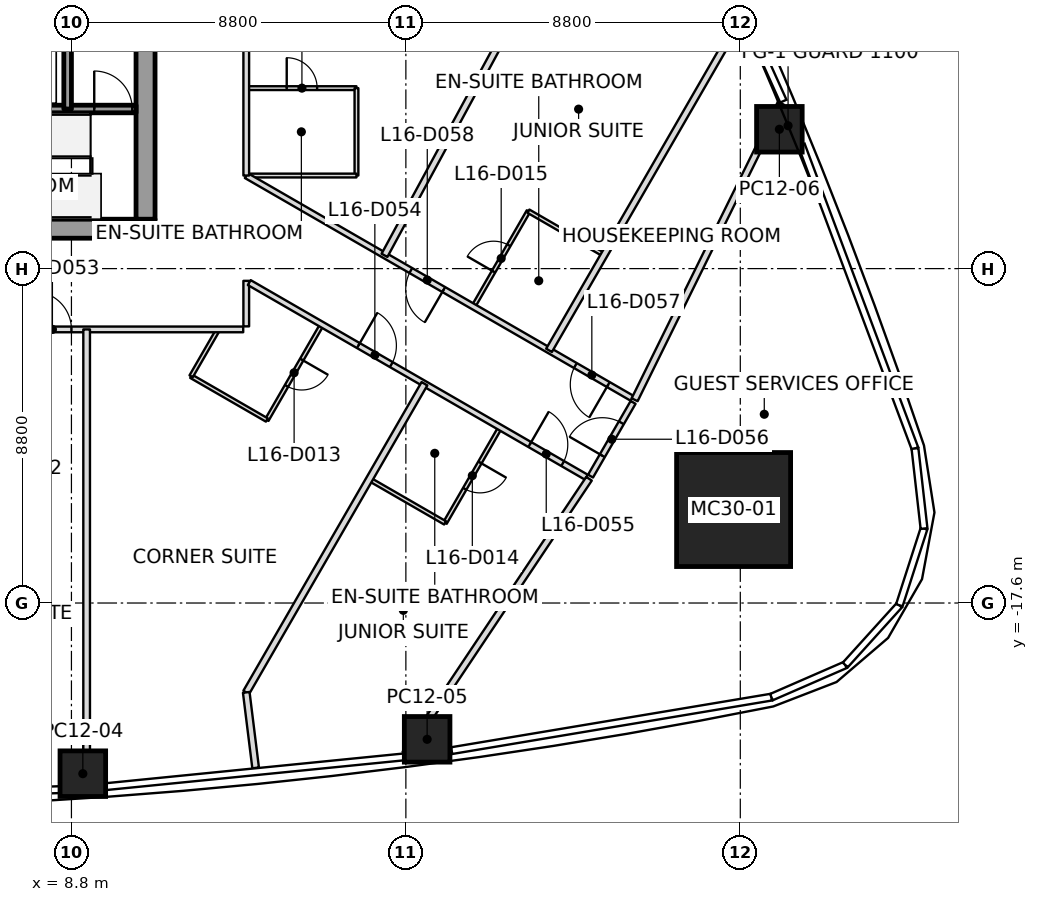
"""IFC4 building model, lengths in metres.
Left out: names, types, materials, properties, quantities, classifications, styles, units other than length and angle.
Written with IfcOpenShell. Run it as: python <this file> out.ifc"""

import sys

from ifc_helpers import new_model, si_unit, direction, frame, frame_2d, origin, origin_2d, place, context, subcontext, project, spatial, rectangle, extrude, clip, halfspace, element, fill, save


model = new_model("IFC4")
c1 = context("Model", 3, precision=1e-05, world=origin(), true_north=direction((0.0, 1.0)))
c2 = subcontext(c1, "Body", "Model", "MODEL_VIEW")
j1 = project(units=[si_unit("LENGTHUNIT", "METRE"), si_unit("PLANEANGLEUNIT", "RADIAN")], contexts=[c1])
p1 = place(None, origin())
s1 = spatial("IfcSite", under=j1, at=p1, CompositionType="ELEMENT")
p2 = place(p1, origin())
s2 = spatial("IfcBuilding", under=s1, at=p2, CompositionType="ELEMENT")
p3 = place(p2, frame((0.0, 0.0, 81.3)))
s3 = spatial("IfcBuildingStorey", under=s2, at=p3, CompositionType="ELEMENT", Elevation=81.3)
p4 = place(p3, frame((26.224, -15.14, 0.0), z_axis=(-0.030531992032, 0.017607001884, 0.999378702468), x_axis=(0.999533790055, 0.000537827582, 0.03052725469)))
e1 = element("IfcColumn", 1, at=p4, inside=s3, PredefinedType="COLUMN", context=c2, shape_type="SweptSolid", body=[
    extrude(rectangle(XDim=3.0, YDim=3.0, at=origin_2d()), origin(), (0.0, 0.0, 1.0), 3.702),
])
p5 = place(p3, frame((9.1, -22.091, 0.0), z_axis=(-0.009632635025, 0.012073782257, 0.999880710947), x_axis=(0.997756100606, 0.066371190404, 0.008810720082)))
e2 = element("IfcColumn", 2, at=p5, inside=s3, PredefinedType="COLUMN", context=c2, shape_type="SweptSolid", body=[
    clip(extrude(rectangle(XDim=1.2, YDim=1.2, at=origin_2d()), origin(), (0.0, 0.0, 1.0), 3.7), halfspace(frame((0.0, 0.0, 0.009)), True)),
])
p6 = place(p3, frame((18.16, -21.187, 0.0), z_axis=(-0.019262752912, 0.011346553085, 0.999750069809), x_axis=(0.991035318341, 0.132436881846, 0.017591763067)))
e3 = element("IfcColumn", 3, at=p6, inside=s3, PredefinedType="COLUMN", context=c2, shape_type="SweptSolid", body=[
    clip(extrude(rectangle(XDim=1.2, YDim=1.2, at=origin_2d()), origin(), (0.0, 0.0, 1.0), 3.701), halfspace(frame((0.0, 0.0, 0.008)), True)),
])
p7 = place(p3, frame((27.428, -5.133, 0.0), z_axis=(-0.019460669214, 0.010950749456, 0.999750650632), x_axis=(-0.381024023637, 0.924398704075, -0.017542215233)))
e4 = element("IfcColumn", 4, at=p7, inside=s3, PredefinedType="COLUMN", context=c2, shape_type="SweptSolid", body=[
    extrude(rectangle(XDim=1.2, YDim=1.2, at=origin_2d()), origin(), (0.0, 0.0, 1.0), 3.701),
])
p8 = place(p3, frame((-11.0, -7.75, 0.0), z_axis=(0.0, 0.0, 1.0), x_axis=(1.0, 0.0, 0.0)))
e5 = element("IfcWall", 5, at=p8, inside=s3, PredefinedType="SHEAR", context=c2, shape_type="SweptSolid", body=[
    extrude(rectangle(XDim=22.0, YDim=0.5, at=frame_2d((11.0, 0.0))), origin(), (0.0, 0.0, 1.0), 3.7),
])
p9 = place(p8, frame((10.45, 0.0, 0.0)))
e6 = element("IfcOpeningElement", 6, at=p9, cuts=e5, PredefinedType="OPENING", context=c2, shape_type="SweptSolid", body=[
    extrude(rectangle(XDim=1.1, YDim=2.1, at=frame_2d((0.55, 1.05))), frame((0.0, 0.25, 0.0), z_axis=(0.0, -1.0, 0.0), x_axis=(1.0, 0.0, 0.0)), (0.0, 0.0, 1.0), 0.5),
])
p10 = place(p3, frame((10.75, -7.5, 0.0), z_axis=(0.0, 0.0, 1.0), x_axis=(0.0, 1.0, 0.0)))
e7 = element("IfcWall", 7, at=p10, inside=s3, PredefinedType="SHEAR", context=c2, shape_type="SweptSolid", body=[
    extrude(rectangle(XDim=15.0, YDim=0.5, at=frame_2d((7.5, 0.0))), origin(), (0.0, 0.0, 1.0), 3.7),
])
p11 = place(p10, frame((6.6, 0.0, 0.0)))
e8 = element("IfcOpeningElement", 8, at=p11, cuts=e7, PredefinedType="OPENING", context=c2, shape_type="SweptSolid", body=[
    extrude(rectangle(XDim=1.8, YDim=2.1, at=frame_2d((0.9, 1.05))), frame((0.0, 0.25, 0.0), z_axis=(0.0, -1.0, 0.0), x_axis=(1.0, 0.0, 0.0)), (0.0, 0.0, 1.0), 0.5),
])
p12 = place(p3, frame((6.1, -4.6, 0.0), z_axis=(0.0, 0.0, 1.0), x_axis=(1.0, 0.0, 0.0)))
e9 = element("IfcWall", 9, at=p12, inside=s3, PredefinedType="SOLIDWALL", context=c2, shape_type="SweptSolid", body=[
    extrude(rectangle(XDim=2.6, YDim=0.2, at=frame_2d((1.3, 0.0))), origin(), (0.0, 0.0, 1.0), 3.55),
])
p13 = place(p3, frame((8.7, -4.6, 0.0), z_axis=(0.0, 0.0, 1.0), x_axis=(1.0, 0.0, 0.0)))
e10 = element("IfcWall", 10, at=p13, inside=s3, PredefinedType="SOLIDWALL", context=c2, shape_type="SweptSolid", body=[
    extrude(rectangle(XDim=1.8, YDim=0.2, at=frame_2d((0.9, 0.0))), origin(), (0.0, 0.0, 1.0), 3.55),
])
p14 = place(p13, frame((0.7, 0.0, 0.0)))
e11 = element("IfcOpeningElement", 11, at=p14, cuts=e10, PredefinedType="OPENING", context=c2, shape_type="SweptSolid", body=[
    extrude(rectangle(XDim=1.0, YDim=2.1, at=frame_2d((0.5, 1.05))), frame((0.0, 0.1, 0.0), z_axis=(0.0, -1.0, 0.0), x_axis=(1.0, 0.0, 0.0)), (0.0, 0.0, 1.0), 0.2),
])
p15 = place(p3, frame((8.7, -1.8, 0.0), z_axis=(0.0, 0.0, 1.0), x_axis=(0.0, -1.0, 0.0)))
e12 = element("IfcWall", 12, at=p15, inside=s3, PredefinedType="SOLIDWALL", context=c2, shape_type="SweptSolid", body=[
    extrude(rectangle(XDim=2.8, YDim=0.2, at=frame_2d((1.4, 0.0))), origin(), (0.0, 0.0, 1.0), 3.55),
])
p16 = place(p3, frame((9.2, -10.4, 0.0), z_axis=(0.0, 0.0, 1.0), x_axis=(0.0, -1.0, 0.0)))
e13 = element("IfcWall", 13, at=p16, inside=s3, PredefinedType="PARTITIONING", context=c2, shape_type="SweptSolid", body=[
    extrude(rectangle(XDim=12.213, YDim=0.175, at=frame_2d((6.106, 0.0))), origin(), (0.0, 0.0, 1.0), 3.15),
])
p17 = place(p3, frame((18.089, -11.83, 0.0), z_axis=(0.0, 0.0, 1.0), x_axis=(-0.500005634617, -0.866022150612, 0.0)))
e14 = element("IfcWall", 14, at=p17, inside=s3, PredefinedType="PARTITIONING", context=c2, shape_type="SweptSolid", body=[
    extrude(rectangle(XDim=9.378, YDim=0.175, at=frame_2d((4.689, 0.0))), origin(), (0.0, 0.0, 1.0), 3.093),
])
p18 = place(p3, frame((13.4, -19.951, 0.0), z_axis=(0.0, 0.0, 1.0), x_axis=(0.123344664517, -0.992363891793, 0.0)))
e15 = element("IfcWall", 15, at=p18, inside=s3, PredefinedType="PARTITIONING", context=c2, shape_type="SweptSolid", body=[
    extrude(rectangle(XDim=2.003, YDim=0.175, at=frame_2d((1.001, 0.0))), origin(), (0.0, 0.0, 1.0), 2.934),
])
p19 = place(p3, frame((23.685, 3.826, 0.0), z_axis=(0.0, 0.0, 1.0), x_axis=(-0.476143437268, -0.879367629121, 0.0)))
e16 = element("IfcWall", 16, at=p19, inside=s3, PredefinedType="PARTITIONING", context=c2, shape_type="SweptSolid", body=[
    extrude(rectangle(XDim=13.962, YDim=0.175, at=frame_2d((6.981, 0.0))), origin(), (0.0, 0.0, 1.0), 2.947),
])
p20 = place(p3, frame((22.419, -14.33, 0.0), z_axis=(0.0, 0.0, 1.0), x_axis=(-0.555535204136, -0.831493016787, 0.0)))
e17 = element("IfcWall", 17, at=p20, inside=s3, PredefinedType="PARTITIONING", context=c2, shape_type="SweptSolid", body=[
    extrude(rectangle(XDim=8.701, YDim=0.175, at=frame_2d((4.351, 0.0))), origin(), (0.0, 0.0, 1.0), 3.15),
])
p21 = place(p3, frame((26.61, -1.871, 0.0), z_axis=(0.0, 0.0, 1.0), x_axis=(-0.500003296978, -0.866023500265, 0.0)))
e18 = element("IfcWall", 18, at=p21, inside=s3, PredefinedType="PARTITIONING", context=c2, shape_type="SweptSolid", body=[
    extrude(rectangle(XDim=10.485, YDim=0.175, at=frame_2d((5.242, 0.0))), origin(), (0.0, 0.0, 1.0), 2.934),
])
p22 = place(p3, frame((23.619, -12.251, 0.0), z_axis=(0.0, 0.0, 1.0), x_axis=(0.442347207514, 0.896843881623, 0.0)))
e19 = element("IfcWall", 19, at=p22, inside=s3, PredefinedType="PARTITIONING", context=c2, shape_type="SweptSolid", body=[
    extrude(rectangle(XDim=8.701, YDim=0.175, at=frame_2d((4.351, 0.0))), origin(), (0.0, 0.0, 1.0), 3.15),
])
p23 = place(p3, frame((-13.32, -10.4, 0.0), z_axis=(0.0, 0.0, 1.0), x_axis=(1.0, 0.0, 0.0)))
e20 = element("IfcWall", 20, at=p23, inside=s3, PredefinedType="PARTITIONING", context=c2, shape_type="SweptSolid", body=[
    extrude(rectangle(XDim=26.64, YDim=0.15, at=frame_2d((13.32, 0.0))), origin(), (0.0, 0.0, 1.0), 2.947),
])
p24 = place(p23, frame((7.72, 0.0, 0.0)))
e21 = element("IfcOpeningElement", 21, at=p24, cuts=e20, PredefinedType="OPENING", context=c2, shape_type="SweptSolid", body=[
    extrude(rectangle(XDim=1.0, YDim=2.1, at=frame_2d((0.5, 1.05))), frame((0.0, 0.075, 0.0), z_axis=(0.0, -1.0, 0.0), x_axis=(1.0, 0.0, 0.0)), (0.0, 0.0, 1.0), 0.15),
])
p25 = place(p23, frame((11.92, 0.0, 0.0)))
e22 = element("IfcOpeningElement", 22, at=p25, cuts=e20, PredefinedType="OPENING", context=c2, shape_type="SweptSolid", body=[
    extrude(rectangle(XDim=1.0, YDim=2.1, at=frame_2d((0.5, 1.05))), frame((0.0, 0.075, 0.0), z_axis=(0.0, -1.0, 0.0), x_axis=(1.0, 0.0, 0.0)), (0.0, 0.0, 1.0), 0.15),
])
p26 = place(p23, frame((16.52, 0.0, 0.0)))
e23 = element("IfcOpeningElement", 23, at=p26, cuts=e20, PredefinedType="OPENING", context=c2, shape_type="SweptSolid", body=[
    extrude(rectangle(XDim=1.0, YDim=2.1, at=frame_2d((0.5, 1.05))), frame((0.0, 0.075, 0.0), z_axis=(0.0, -1.0, 0.0), x_axis=(1.0, 0.0, 0.0)), (0.0, 0.0, 1.0), 0.15),
])
p27 = place(p23, frame((21.12, 0.0, 0.0)))
e24 = element("IfcOpeningElement", 24, at=p27, cuts=e20, PredefinedType="OPENING", context=c2, shape_type="SweptSolid", body=[
    extrude(rectangle(XDim=1.0, YDim=2.1, at=frame_2d((0.5, 1.05))), frame((0.0, 0.075, 0.0), z_axis=(0.0, -1.0, 0.0), x_axis=(1.0, 0.0, 0.0)), (0.0, 0.0, 1.0), 0.15),
])
p28 = place(p3, frame((13.4, -10.32, 0.0), z_axis=(0.0, 0.0, 1.0), x_axis=(0.0, 1.0, 0.0)))
e25 = element("IfcWall", 25, at=p28, inside=s3, PredefinedType="PARTITIONING", context=c2, shape_type="SweptSolid", body=[
    extrude(rectangle(XDim=1.198, YDim=0.15, at=frame_2d((0.599, 0.0))), origin(), (0.0, 0.0, 1.0), 2.797),
])
p29 = place(p3, frame((13.479, -9.168, 0.0), z_axis=(0.0, 0.0, 1.0), x_axis=(0.866025631158, -0.499999606177, 0.0)))
e26 = element("IfcWall", 26, at=p29, inside=s3, PredefinedType="PARTITIONING", context=c2, shape_type="SweptSolid", body=[
    extrude(rectangle(XDim=10.243, YDim=0.15, at=frame_2d((5.122, 0.0))), origin(), (0.0, 0.0, 1.0), 2.797),
])
p30 = place(p29, frame((3.316, 0.0, 0.0)))
e27 = element("IfcOpeningElement", 27, at=p30, cuts=e26, PredefinedType="OPENING", context=c2, shape_type="SweptSolid", body=[
    extrude(rectangle(XDim=1.0, YDim=2.1, at=frame_2d((0.5, 1.05))), frame((0.0, 0.075, 0.0), z_axis=(0.0, -1.0, 0.0), x_axis=(1.0, 0.0, 0.0)), (0.0, 0.0, 1.0), 0.15),
])
p31 = place(p29, frame((8.523, 0.0, 0.0)))
e28 = element("IfcOpeningElement", 28, at=p31, cuts=e26, PredefinedType="OPENING", context=c2, shape_type="SweptSolid", body=[
    extrude(rectangle(XDim=1.0, YDim=2.1, at=frame_2d((0.5, 1.05))), frame((0.0, 0.075, 0.0), z_axis=(0.0, -1.0, 0.0), x_axis=(1.0, 0.0, 0.0)), (0.0, 0.0, 1.0), 0.15),
])
p32 = place(p3, frame((23.55, -12.211, 0.0), z_axis=(0.0, 0.0, 1.0), x_axis=(-0.866028447449, 0.499994728181, 0.0)))
e29 = element("IfcWall", 29, at=p32, inside=s3, PredefinedType="PARTITIONING", context=c2, shape_type="SweptSolid", body=[
    extrude(rectangle(XDim=11.72, YDim=0.15, at=frame_2d((5.86, 0.0))), origin(), (0.0, 0.0, 1.0), 2.947),
])
p33 = place(p32, frame((0.72, 0.0, 0.0)))
e30 = element("IfcOpeningElement", 30, at=p33, cuts=e29, PredefinedType="OPENING", context=c2, shape_type="SweptSolid", body=[
    extrude(rectangle(XDim=1.0, YDim=2.1, at=frame_2d((0.5, 1.05))), frame((0.0, 0.075, 0.0), z_axis=(0.0, -1.0, 0.0), x_axis=(1.0, 0.0, 0.0)), (0.0, 0.0, 1.0), 0.15),
])
p34 = place(p32, frame((5.72, 0.0, 0.0)))
e31 = element("IfcOpeningElement", 31, at=p34, cuts=e29, PredefinedType="OPENING", context=c2, shape_type="SweptSolid", body=[
    extrude(rectangle(XDim=1.0, YDim=2.1, at=frame_2d((0.5, 1.05))), frame((0.0, 0.075, 0.0), z_axis=(0.0, -1.0, 0.0), x_axis=(1.0, 0.0, 0.0)), (0.0, 0.0, 1.0), 0.15),
])
p35 = place(p3, frame((13.4, -6.351, 0.0), z_axis=(0.0, 0.0, 1.0), x_axis=(0.0, 1.0, 0.0)))
e32 = element("IfcWall", 32, at=p35, inside=s3, PredefinedType="PARTITIONING", context=c2, shape_type="SweptSolid", body=[
    extrude(rectangle(XDim=16.671, YDim=0.15, at=frame_2d((8.335, 0.0))), origin(), (0.0, 0.0, 1.0), 2.947),
])
p36 = place(p35, frame((6.976, 0.0, 0.0)))
e33 = element("IfcOpeningElement", 33, at=p36, cuts=e32, PredefinedType="OPENING", context=c2, shape_type="SweptSolid", body=[
    extrude(rectangle(XDim=1.0, YDim=2.1, at=frame_2d((0.5, 1.05))), frame((0.0, 0.075, 0.0), z_axis=(0.0, -1.0, 0.0), x_axis=(1.0, 0.0, 0.0)), (0.0, 0.0, 1.0), 0.15),
])
p37 = place(p35, frame((14.151, 0.0, 0.0)))
e34 = element("IfcOpeningElement", 34, at=p37, cuts=e32, PredefinedType="OPENING", context=c2, shape_type="SweptSolid", body=[
    extrude(rectangle(XDim=1.0, YDim=2.1, at=frame_2d((0.5, 1.05))), frame((0.0, 0.075, 0.0), z_axis=(0.0, -1.0, 0.0), x_axis=(1.0, 0.0, 0.0)), (0.0, 0.0, 1.0), 0.15),
])
p38 = place(p3, frame((22.459, -14.26, 0.0), z_axis=(0.0, 0.0, 1.0), x_axis=(0.49994888933, 0.866054910533, 0.0)))
e35 = element("IfcWall", 35, at=p38, inside=s3, PredefinedType="PARTITIONING", context=c2, shape_type="SweptSolid", body=[
    extrude(rectangle(XDim=2.24, YDim=0.15, at=frame_2d((1.12, 0.0))), origin(), (0.0, 0.0, 1.0), 2.797),
])
p39 = place(p38, frame((0.62, 0.0, 0.0)))
e36 = element("IfcOpeningElement", 36, at=p39, cuts=e35, PredefinedType="OPENING", context=c2, shape_type="SweptSolid", body=[
    extrude(rectangle(XDim=1.0, YDim=2.1, at=frame_2d((0.5, 1.05))), frame((0.0, 0.075, 0.0), z_axis=(0.0, -1.0, 0.0), x_axis=(1.0, 0.0, 0.0)), (0.0, 0.0, 1.0), 0.15),
])
p40 = place(p3, frame((15.377, -10.298, 0.0), z_axis=(0.0, 0.0, 1.0), x_axis=(-0.499999802827, -0.866025517622, 0.0)))
e37 = element("IfcWall", 37, at=p40, inside=s3, PredefinedType="PARTITIONING", context=c2, shape_type="SweptSolid", body=[
    extrude(rectangle(XDim=2.87, YDim=0.1, at=frame_2d((1.435, 0.0))), origin(), (0.0, 0.0, 1.0), 2.797),
])
p41 = place(p40, frame((1.035, 0.0, 0.0)))
e38 = element("IfcOpeningElement", 38, at=p41, cuts=e37, PredefinedType="OPENING", context=c2, shape_type="SweptSolid", body=[
    extrude(rectangle(XDim=0.8, YDim=2.1, at=frame_2d((0.4, 1.05))), frame((0.0, 0.05, 0.0), z_axis=(0.0, -1.0, 0.0), x_axis=(1.0, 0.0, 0.0)), (0.0, 0.0, 1.0), 0.1),
])
p42 = place(p3, frame((13.942, -12.784, 0.0), z_axis=(0.0, 0.0, 1.0), x_axis=(-0.866007057882, 0.500031774688, 0.0)))
e39 = element("IfcWall", 39, at=p42, inside=s3, PredefinedType="PARTITIONING", context=c2, shape_type="SweptSolid", body=[
    extrude(rectangle(XDim=2.3, YDim=0.1, at=frame_2d((1.15, 0.0))), origin(), (0.0, 0.0, 1.0), 3.15),
])
p43 = place(p3, frame((11.95, -11.634, 0.0), z_axis=(0.0, 0.0, 1.0), x_axis=(0.500087364259, 0.86597495813, 0.0)))
e40 = element("IfcWall", 40, at=p43, inside=s3, PredefinedType="PARTITIONING", context=c2, shape_type="SweptSolid", body=[
    extrude(rectangle(XDim=1.39, YDim=0.1, at=frame_2d((0.695, 0.0))), origin(), (0.0, 0.0, 1.0), 3.15),
])
p44 = place(p3, frame((13.43, -4.051, 0.0), z_axis=(0.0, 0.0, 1.0), x_axis=(1.0, 0.0, 0.0)))
e41 = element("IfcWall", 41, at=p44, inside=s3, PredefinedType="PARTITIONING", context=c2, shape_type="SweptSolid", body=[
    extrude(rectangle(XDim=2.87, YDim=0.1, at=frame_2d((1.435, 0.0))), origin(), (0.0, 0.0, 1.0), 2.947),
])
p45 = place(p44, frame((1.035, 0.0, 0.0)))
e42 = element("IfcOpeningElement", 42, at=p45, cuts=e41, PredefinedType="OPENING", context=c2, shape_type="SweptSolid", body=[
    extrude(rectangle(XDim=0.8, YDim=2.1, at=frame_2d((0.4, 1.05))), frame((0.0, 0.05, 0.0), z_axis=(0.0, -1.0, 0.0), x_axis=(1.0, 0.0, 0.0)), (0.0, 0.0, 1.0), 0.1),
])
p46 = place(p3, frame((16.3, -4.051, 0.0), z_axis=(0.0, 0.0, 1.0), x_axis=(0.0, -1.0, 0.0)))
e43 = element("IfcWall", 43, at=p46, inside=s3, PredefinedType="PARTITIONING", context=c2, shape_type="SweptSolid", body=[
    extrude(rectangle(XDim=2.3, YDim=0.1, at=frame_2d((1.15, 0.0))), origin(), (0.0, 0.0, 1.0), 3.15),
])
p47 = place(p3, frame((16.3, -6.351, 0.0), z_axis=(0.0, 0.0, 1.0), x_axis=(-1.0, 0.0, 0.0)))
e44 = element("IfcWall", 44, at=p47, inside=s3, PredefinedType="PARTITIONING", context=c2, shape_type="SweptSolid", body=[
    extrude(rectangle(XDim=2.84, YDim=0.1, at=frame_2d((1.42, 0.0))), origin(), (0.0, 0.0, 1.0), 3.15),
])
p48 = place(p3, frame((20.066, -13.006, 0.0), z_axis=(0.0, 0.0, 1.0), x_axis=(-0.500036638401, -0.866004249561, 0.0)))
e45 = element("IfcWall", 45, at=p48, inside=s3, PredefinedType="PARTITIONING", context=c2, shape_type="SweptSolid", body=[
    extrude(rectangle(XDim=2.87, YDim=0.1, at=frame_2d((1.435, 0.0))), origin(), (0.0, 0.0, 1.0), 3.15),
])
p49 = place(p48, frame((1.035, 0.0, 0.0)))
e46 = element("IfcOpeningElement", 46, at=p49, cuts=e45, PredefinedType="OPENING", context=c2, shape_type="SweptSolid", body=[
    extrude(rectangle(XDim=0.8, YDim=2.1, at=frame_2d((0.4, 1.05))), frame((0.0, 0.05, 0.0), z_axis=(0.0, -1.0, 0.0), x_axis=(1.0, 0.0, 0.0)), (0.0, 0.0, 1.0), 0.1),
])
p50 = place(p3, frame((18.631, -15.491, 0.0), z_axis=(0.0, 0.0, 1.0), x_axis=(-0.866017224141, 0.500014167291, 0.0)))
e47 = element("IfcWall", 47, at=p50, inside=s3, PredefinedType="PARTITIONING", context=c2, shape_type="SweptSolid", body=[
    extrude(rectangle(XDim=2.27, YDim=0.1, at=frame_2d((1.135, 0.0))), origin(), (0.0, 0.0, 1.0), 3.15),
])
p51 = place(p3, frame((19.391, -9.775, 0.0), z_axis=(0.0, 0.0, 1.0), x_axis=(0.499999802827, 0.866025517622, 0.0)))
e48 = element("IfcWall", 48, at=p51, inside=s3, PredefinedType="PARTITIONING", context=c2, shape_type="SweptSolid", body=[
    extrude(rectangle(XDim=2.87, YDim=0.1, at=frame_2d((1.435, 0.0))), origin(), (0.0, 0.0, 1.0), 3.15),
])
p52 = place(p51, frame((1.035, 0.0, 0.0)))
e49 = element("IfcOpeningElement", 49, at=p52, cuts=e48, PredefinedType="OPENING", context=c2, shape_type="SweptSolid", body=[
    extrude(rectangle(XDim=0.8, YDim=2.1, at=frame_2d((0.4, 1.05))), frame((0.0, 0.05, 0.0), z_axis=(0.0, -1.0, 0.0), x_axis=(1.0, 0.0, 0.0)), (0.0, 0.0, 1.0), 0.1),
])
p53 = place(p3, frame((20.826, -7.289, 0.0), z_axis=(0.0, 0.0, 1.0), x_axis=(0.866017224141, -0.500014167291, 0.0)))
e50 = element("IfcWall", 50, at=p53, inside=s3, PredefinedType="PARTITIONING", context=c2, shape_type="SweptSolid", body=[
    extrude(rectangle(XDim=2.27, YDim=0.1, at=frame_2d((1.135, 0.0))), origin(), (0.0, 0.0, 1.0), 3.15),
])
p54 = place(p45, origin())
e51 = element("IfcDoor", 51, at=p54, inside=s3, OperationType="SINGLE_SWING_LEFT", PredefinedType="DOOR", context=c2, shape_type="SweptSolid", body=[
    extrude(rectangle(XDim=0.8, YDim=2.1, at=frame_2d((0.4, 1.05))), frame((0.0, 0.025, 0.0), z_axis=(0.0, -1.0, 0.0), x_axis=(1.0, 0.0, 0.0)), (0.0, 0.0, 1.0), 0.05),
])
fill(e42, e51)
p55 = place(p27, origin())
e52 = element("IfcDoor", 52, at=p55, inside=s3, OperationType="SINGLE_SWING_LEFT", PredefinedType="DOOR", context=c2, shape_type="SweptSolid", body=[
    extrude(rectangle(XDim=1.0, YDim=2.1, at=frame_2d((0.5, 1.05))), frame((0.0, 0.025, 0.0), z_axis=(0.0, -1.0, 0.0), x_axis=(1.0, 0.0, 0.0)), (0.0, 0.0, 1.0), 0.05),
])
fill(e24, e52)
p56 = place(p30, origin())
e53 = element("IfcDoor", 53, at=p56, inside=s3, OperationType="SINGLE_SWING_LEFT", PredefinedType="DOOR", context=c2, shape_type="SweptSolid", body=[
    extrude(rectangle(XDim=1.0, YDim=2.1, at=frame_2d((0.5, 1.05))), frame((0.0, 0.025, 0.0), z_axis=(0.0, -1.0, 0.0), x_axis=(1.0, 0.0, 0.0)), (0.0, 0.0, 1.0), 0.05),
])
fill(e27, e53)
p57 = place(p41, origin())
e54 = element("IfcDoor", 54, at=p57, inside=s3, OperationType="SINGLE_SWING_LEFT", PredefinedType="DOOR", context=c2, shape_type="SweptSolid", body=[
    extrude(rectangle(XDim=0.8, YDim=2.1, at=frame_2d((0.4, 1.05))), frame((0.0, 0.025, 0.0), z_axis=(0.0, -1.0, 0.0), x_axis=(1.0, 0.0, 0.0)), (0.0, 0.0, 1.0), 0.05),
])
fill(e38, e54)
p58 = place(p31, origin())
e55 = element("IfcDoor", 55, at=p58, inside=s3, OperationType="SINGLE_SWING_LEFT", PredefinedType="DOOR", context=c2, shape_type="SweptSolid", body=[
    extrude(rectangle(XDim=1.0, YDim=2.1, at=frame_2d((0.5, 1.05))), frame((0.0, 0.025, 0.0), z_axis=(0.0, -1.0, 0.0), x_axis=(1.0, 0.0, 0.0)), (0.0, 0.0, 1.0), 0.05),
])
fill(e28, e55)
p59 = place(p49, origin())
e56 = element("IfcDoor", 56, at=p59, inside=s3, OperationType="SINGLE_SWING_RIGHT", PredefinedType="DOOR", context=c2, shape_type="SweptSolid", body=[
    extrude(rectangle(XDim=0.8, YDim=2.1, at=frame_2d((0.4, 1.05))), frame((0.0, 0.025, 0.0), z_axis=(0.0, -1.0, 0.0), x_axis=(1.0, 0.0, 0.0)), (0.0, 0.0, 1.0), 0.05),
])
fill(e46, e56)
p60 = place(p39, origin())
e57 = element("IfcDoor", 57, at=p60, inside=s3, OperationType="SINGLE_SWING_RIGHT", PredefinedType="DOOR", context=c2, shape_type="SweptSolid", body=[
    extrude(rectangle(XDim=1.0, YDim=2.1, at=frame_2d((0.5, 1.05))), frame((0.0, 0.025, 0.0), z_axis=(0.0, -1.0, 0.0), x_axis=(1.0, 0.0, 0.0)), (0.0, 0.0, 1.0), 0.05),
])
fill(e36, e57)
p61 = place(p33, origin())
e58 = element("IfcDoor", 58, at=p61, inside=s3, OperationType="SINGLE_SWING_RIGHT", PredefinedType="DOOR", context=c2, shape_type="SweptSolid", body=[
    extrude(rectangle(XDim=1.0, YDim=2.1, at=frame_2d((0.5, 1.05))), frame((0.0, 0.025, 0.0), z_axis=(0.0, -1.0, 0.0), x_axis=(1.0, 0.0, 0.0)), (0.0, 0.0, 1.0), 0.05),
])
fill(e30, e58)
p62 = place(p34, origin())
e59 = element("IfcDoor", 59, at=p62, inside=s3, OperationType="SINGLE_SWING_LEFT", PredefinedType="DOOR", context=c2, shape_type="SweptSolid", body=[
    extrude(rectangle(XDim=1.0, YDim=2.1, at=frame_2d((0.5, 1.05))), frame((0.0, 0.025, 0.0), z_axis=(0.0, -1.0, 0.0), x_axis=(1.0, 0.0, 0.0)), (0.0, 0.0, 1.0), 0.05),
])
fill(e31, e59)
p63 = place(p52, origin())
e60 = element("IfcDoor", 60, at=p63, inside=s3, OperationType="SINGLE_SWING_RIGHT", PredefinedType="DOOR", context=c2, shape_type="SweptSolid", body=[
    extrude(rectangle(XDim=0.8, YDim=2.1, at=frame_2d((0.4, 1.05))), frame((0.0, 0.025, 0.0), z_axis=(0.0, -1.0, 0.0), x_axis=(1.0, 0.0, 0.0)), (0.0, 0.0, 1.0), 0.05),
])
fill(e49, e60)
p64 = place(p14, origin())
e61 = element("IfcDoor", 61, at=p64, inside=s3, OperationType="SINGLE_SWING_RIGHT", PredefinedType="DOOR", context=c2, shape_type="SweptSolid", body=[
    extrude(rectangle(XDim=1.0, YDim=2.1, at=frame_2d((0.5, 1.05))), frame((0.0, 0.025, 0.0), z_axis=(0.0, -1.0, 0.0), x_axis=(1.0, 0.0, 0.0)), (0.0, 0.0, 1.0), 0.05),
])
fill(e11, e61)
save(model, sys.argv[1])
